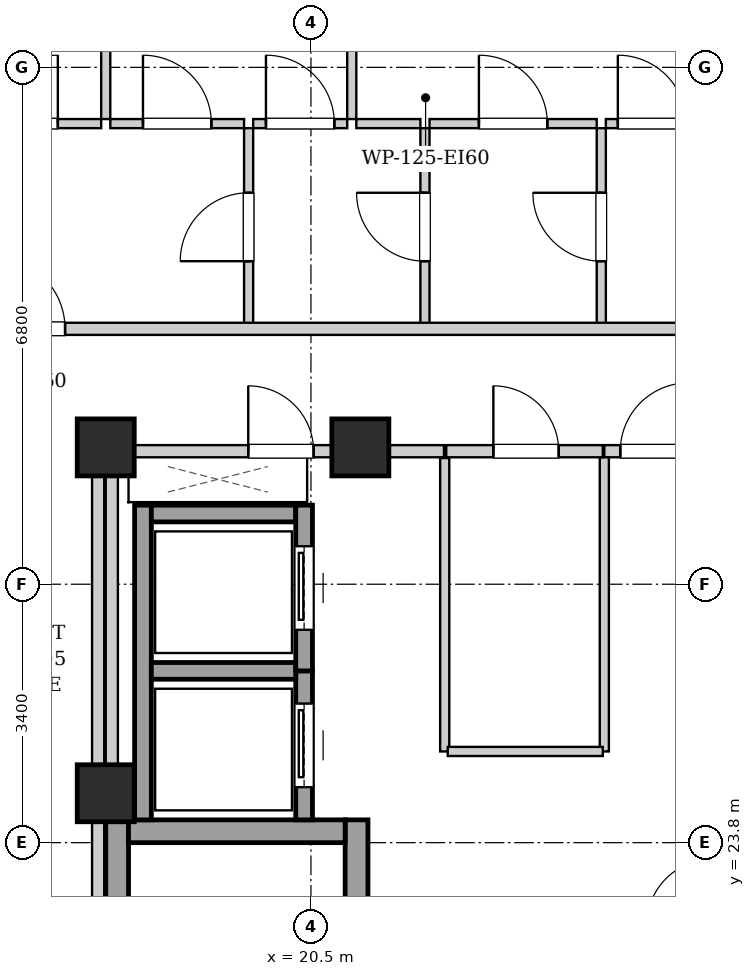
"""IFC4 building model, lengths in metres.
Left out: names, types, materials, properties, quantities, classifications, styles, units other than length and angle.
Written with IfcOpenShell. Run it as: python <this file> out.ifc"""

import sys

from ifc_helpers import new_model, si_unit, direction, frame, frame_2d, origin, origin_2d, place, context, subcontext, project, spatial, rectangle, extrude, element, fill, save


model = new_model("IFC4")
c1 = context("Model", 3, precision=1e-05, world=origin(), true_north=direction((0.0, 1.0)))
c2 = subcontext(c1, "Body", "Model", "MODEL_VIEW")
j1 = project(units=[si_unit("LENGTHUNIT", "METRE"), si_unit("PLANEANGLEUNIT", "RADIAN")], contexts=[c1])
p1 = place(None, origin())
s1 = spatial("IfcSite", under=j1, at=p1, CompositionType="ELEMENT")
p2 = place(p1, origin())
s2 = spatial("IfcBuilding", under=s1, at=p2, CompositionType="ELEMENT")
p3 = place(p2, frame((0.0, 0.0, 258.1)))
s3 = spatial("IfcBuildingStorey", under=s2, at=p3, CompositionType="ELEMENT", Elevation=258.1)
for number, where, z_axis, x_axis in (
    (1, (17.8, 29.0, 0.0), (0.0, 0.0, 1.0), (1.0, 0.0, 0.0)),
    (2, (21.15, 29.0, 0.0), (0.0, 0.0, 1.0), (1.0, 0.0, 0.0)),
    (3, (17.8, 24.45, 0.0), (0.0, 0.0, 1.0), (1.0, 0.0, 0.0)),
):
    element("IfcColumn", number, at=place(p3, frame(where, z_axis=z_axis, x_axis=x_axis)), inside=s3, PredefinedType="COLUMN", context=c2, shape_type="SweptSolid", body=[
        extrude(rectangle(XDim=0.75, YDim=0.75, at=origin_2d()), origin(), (0.0, 0.0, 1.0), 3.4),
    ])
for number, where, z_axis, x_axis in (
    (4, (17.95, 15.1, 0.0), (0.0, 0.0, 1.0), (0.0, 1.0, 0.0)),
    (5, (21.1, 15.1, 0.0), (0.0, 0.0, 1.0), (0.0, 1.0, 0.0)),
):
    element("IfcWall", number, at=place(p3, frame(where, z_axis=z_axis, x_axis=x_axis)), inside=s3, PredefinedType="SHEAR", context=c2, shape_type="SweptSolid", body=[
        extrude(rectangle(XDim=9.0, YDim=0.3, at=frame_2d((4.5, 0.0))), origin(), (0.0, 0.0, 1.0), 3.05),
    ])
p4 = place(p3, frame((18.1, 23.95, 0.0), z_axis=(0.0, 0.0, 1.0), x_axis=(1.0, 0.0, 0.0)))
e6 = element("IfcWall", 6, at=p4, inside=s3, PredefinedType="SHEAR", context=c2, shape_type="SweptSolid", body=[
    extrude(rectangle(XDim=2.85, YDim=0.3, at=frame_2d((1.425, 0.0))), origin(), (0.0, 0.0, 1.0), 3.05),
])
p5 = place(p3, frame((18.29, 24.1, 0.0), z_axis=(0.0, 0.0, 1.0), x_axis=(0.0, 1.0, 0.0)))
e7 = element("IfcWall", 7, at=p5, inside=s3, PredefinedType="SHEAR", context=c2, shape_type="SweptSolid", body=[
    extrude(rectangle(XDim=4.14, YDim=0.22, at=frame_2d((2.07, 0.0))), origin(), (0.0, 0.0, 1.0), 3.05),
])
p6 = place(p3, frame((20.41, 24.1, 0.0), z_axis=(0.0, 0.0, 1.0), x_axis=(0.0, 1.0, 0.0)))
e8 = element("IfcWall", 8, at=p6, inside=s3, PredefinedType="SHEAR", context=c2, shape_type="SweptSolid", body=[
    extrude(rectangle(XDim=1.96, YDim=0.22, at=frame_2d((0.98, 0.0))), origin(), (0.0, 0.0, 1.0), 3.05),
])
p7 = place(p6, frame((0.43, 0.0, 0.0)))
e9 = element("IfcOpeningElement", 9, at=p7, cuts=e8, PredefinedType="OPENING", context=c2, shape_type="SweptSolid", body=[
    extrude(rectangle(XDim=1.1, YDim=2.15, at=frame_2d((0.55, 1.075))), frame((0.0, 0.12, 0.0), z_axis=(0.0, -1.0, 0.0), x_axis=(1.0, 0.0, 0.0)), (0.0, 0.0, 1.0), 0.24),
])
for number, where, z_axis, x_axis in (
    (10, (18.4, 26.06, 0.0), (0.0, 0.0, 1.0), (1.0, 0.0, 0.0)),
    (11, (18.4, 28.13, 0.0), (0.0, 0.0, 1.0), (1.0, 0.0, 0.0)),
):
    element("IfcWall", number, at=place(p3, frame(where, z_axis=z_axis, x_axis=x_axis)), inside=s3, PredefinedType="SHEAR", context=c2, shape_type="SweptSolid", body=[
        extrude(rectangle(XDim=1.9, YDim=0.22, at=frame_2d((0.95, 0.0))), origin(), (0.0, 0.0, 1.0), 3.05),
    ])
p8 = place(p3, frame((20.41, 26.06, 0.0), z_axis=(0.0, 0.0, 1.0), x_axis=(0.0, 1.0, 0.0)))
e12 = element("IfcWall", 12, at=p8, inside=s3, PredefinedType="SHEAR", context=c2, shape_type="SweptSolid", body=[
    extrude(rectangle(XDim=2.18, YDim=0.22, at=frame_2d((1.09, 0.0))), origin(), (0.0, 0.0, 1.0), 3.05),
])
p9 = place(p8, frame((0.54, 0.0, 0.0)))
e13 = element("IfcOpeningElement", 13, at=p9, cuts=e12, PredefinedType="OPENING", context=c2, shape_type="SweptSolid", body=[
    extrude(rectangle(XDim=1.1, YDim=2.15, at=frame_2d((0.55, 1.075))), frame((0.0, 0.12, 0.0), z_axis=(0.0, -1.0, 0.0), x_axis=(1.0, 0.0, 0.0)), (0.0, 0.0, 1.0), 0.24),
])
p10 = place(p3, frame((17.88, 24.12, 0.0), z_axis=(0.0, 0.0, 1.0), x_axis=(0.0, 1.0, 0.0)))
e14 = element("IfcWall", 14, at=p10, inside=s3, PredefinedType="PARTITIONING", context=c2, shape_type="SweptSolid", body=[
    extrude(rectangle(XDim=4.76, YDim=0.16, at=frame_2d((2.38, 0.0))), origin(), (0.0, 0.0, 1.0), 2.385),
])
p11 = place(p3, frame((24.36, 28.95, 0.0), z_axis=(0.0, 0.0, 1.0), x_axis=(1.0, 0.0, 0.0)))
e15 = element("IfcWall", 15, at=p11, inside=s3, PredefinedType="PARTITIONING", context=c2, shape_type="SweptSolid", body=[
    extrude(rectangle(XDim=1.32, YDim=0.16, at=frame_2d((0.66, 0.0))), origin(), (0.0, 0.0, 1.0), 2.578),
])
p12 = place(p11, frame((0.21, 0.0, 0.0)))
e16 = element("IfcOpeningElement", 16, at=p12, cuts=e15, PredefinedType="OPENING", context=c2, shape_type="SweptSolid", body=[
    extrude(rectangle(XDim=0.9, YDim=2.05, at=frame_2d((0.45, 1.025))), frame((0.0, 0.09, 0.0), z_axis=(0.0, -1.0, 0.0), x_axis=(1.0, 0.0, 0.0)), (0.0, 0.0, 1.0), 0.18),
])
p13 = place(p3, frame((17.96, 28.95, 0.0), z_axis=(0.0, 0.0, 1.0), x_axis=(1.0, 0.0, 0.0)))
e17 = element("IfcWall", 17, at=p13, inside=s3, PredefinedType="PARTITIONING", context=c2, shape_type="SweptSolid", body=[
    extrude(rectangle(XDim=4.29, YDim=0.16, at=frame_2d((2.145, 0.0))), origin(), (0.0, 0.0, 1.0), 2.578),
])
p14 = place(p13, frame((1.715, 0.0, 0.0)))
e18 = element("IfcOpeningElement", 18, at=p14, cuts=e17, PredefinedType="OPENING", context=c2, shape_type="SweptSolid", body=[
    extrude(rectangle(XDim=0.86, YDim=2.05, at=frame_2d((0.43, 1.025))), frame((0.0, 0.09, 0.0), z_axis=(0.0, -1.0, 0.0), x_axis=(1.0, 0.0, 0.0)), (0.0, 0.0, 1.0), 0.18),
])
p15 = place(p3, frame((24.36, 25.0, 0.0), z_axis=(0.0, 0.0, 1.0), x_axis=(0.0, 1.0, 0.0)))
e19 = element("IfcWall", 19, at=p15, inside=s3, PredefinedType="PARTITIONING", context=c2, shape_type="SweptSolid", body=[
    extrude(rectangle(XDim=3.87, YDim=0.12, at=frame_2d((1.935, 0.0))), origin(), (0.0, 0.0, 1.0), 3.05),
])
p16 = place(p3, frame((22.26, 25.0, 0.0), z_axis=(0.0, 0.0, 1.0), x_axis=(0.0, 1.0, 0.0)))
e20 = element("IfcWall", 20, at=p16, inside=s3, PredefinedType="PARTITIONING", context=c2, shape_type="SweptSolid", body=[
    extrude(rectangle(XDim=3.86, YDim=0.12, at=frame_2d((1.93, 0.0))), origin(), (0.0, 0.0, 1.0), 3.05),
])
p17 = place(p3, frame((22.3, 25.0, 0.0), z_axis=(0.0, 0.0, 1.0), x_axis=(1.0, 0.0, 0.0)))
e21 = element("IfcWall", 21, at=p17, inside=s3, PredefinedType="PARTITIONING", context=c2, shape_type="SweptSolid", body=[
    extrude(rectangle(XDim=2.04, YDim=0.12, at=frame_2d((1.02, 0.0))), origin(), (0.0, 0.0, 1.0), 3.05),
])
p18 = place(p3, frame((22.28, 28.95, 0.0), z_axis=(0.0, 0.0, 1.0), x_axis=(1.0, 0.0, 0.0)))
e22 = element("IfcWall", 22, at=p18, inside=s3, PredefinedType="PARTITIONING", context=c2, shape_type="SweptSolid", body=[
    extrude(rectangle(XDim=2.06, YDim=0.16, at=frame_2d((1.03, 0.0))), origin(), (0.0, 0.0, 1.0), 2.578),
])
p19 = place(p18, frame((0.62, 0.0, 0.0)))
e23 = element("IfcOpeningElement", 23, at=p19, cuts=e22, PredefinedType="OPENING", context=c2, shape_type="SweptSolid", body=[
    extrude(rectangle(XDim=0.86, YDim=2.05, at=frame_2d((0.43, 1.025))), frame((0.0, 0.09, 0.0), z_axis=(0.0, -1.0, 0.0), x_axis=(1.0, 0.0, 0.0)), (0.0, 0.0, 1.0), 0.18),
])
p20 = place(p3, frame((19.68, 30.6, 0.0), z_axis=(0.0, 0.0, 1.0), x_axis=(0.0, 1.0, 0.0)))
e24 = element("IfcWall", 24, at=p20, inside=s3, PredefinedType="PARTITIONING", context=c2, shape_type="SweptSolid", body=[
    extrude(rectangle(XDim=2.6, YDim=0.12, at=frame_2d((1.3, 0.0))), origin(), (0.0, 0.0, 1.0), 3.05),
])
p21 = place(p20, frame((0.85, 0.0, 0.0)))
e25 = element("IfcOpeningElement", 25, at=p21, cuts=e24, PredefinedType="OPENING", context=c2, shape_type="SweptSolid", body=[
    extrude(rectangle(XDim=0.9, YDim=2.05, at=frame_2d((0.45, 1.025))), frame((0.0, 0.07, 0.0), z_axis=(0.0, -1.0, 0.0), x_axis=(1.0, 0.0, 0.0)), (0.0, 0.0, 1.0), 0.14),
])
p22 = place(p3, frame((15.7, 33.26, 0.0), z_axis=(0.0, 0.0, 1.0), x_axis=(1.0, 0.0, 0.0)))
e26 = element("IfcWall", 26, at=p22, inside=s3, PredefinedType="PARTITIONING", context=c2, shape_type="SweptSolid", body=[
    extrude(rectangle(XDim=2.04, YDim=0.12, at=frame_2d((1.02, 0.0))), origin(), (0.0, 0.0, 1.0), 3.05),
])
p23 = place(p22, frame((0.57, 0.0, 0.0)))
e27 = element("IfcOpeningElement", 27, at=p23, cuts=e26, PredefinedType="OPENING", context=c2, shape_type="SweptSolid", body=[
    extrude(rectangle(XDim=0.9, YDim=2.05, at=frame_2d((0.45, 1.025))), frame((0.0, 0.07, 0.0), z_axis=(0.0, -1.0, 0.0), x_axis=(1.0, 0.0, 0.0)), (0.0, 0.0, 1.0), 0.14),
])
p24 = place(p3, frame((17.86, 33.26, 0.0), z_axis=(0.0, 0.0, 1.0), x_axis=(1.0, 0.0, 0.0)))
e28 = element("IfcWall", 28, at=p24, inside=s3, PredefinedType="PARTITIONING", context=c2, shape_type="SweptSolid", body=[
    extrude(rectangle(XDim=1.76, YDim=0.12, at=frame_2d((0.88, 0.0))), origin(), (0.0, 0.0, 1.0), 3.05),
])
p25 = place(p24, frame((0.43, 0.0, 0.0)))
e29 = element("IfcOpeningElement", 29, at=p25, cuts=e28, PredefinedType="OPENING", context=c2, shape_type="SweptSolid", body=[
    extrude(rectangle(XDim=0.9, YDim=2.05, at=frame_2d((0.45, 1.025))), frame((0.0, 0.07, 0.0), z_axis=(0.0, -1.0, 0.0), x_axis=(1.0, 0.0, 0.0)), (0.0, 0.0, 1.0), 0.14),
])
p26 = place(p3, frame((22.0, 30.6, 0.0), z_axis=(0.0, 0.0, 1.0), x_axis=(0.0, 1.0, 0.0)))
e30 = element("IfcWall", 30, at=p26, inside=s3, PredefinedType="PARTITIONING", context=c2, shape_type="SweptSolid", body=[
    extrude(rectangle(XDim=2.6, YDim=0.12, at=frame_2d((1.3, 0.0))), origin(), (0.0, 0.0, 1.0), 3.05),
])
p27 = place(p26, frame((0.85, 0.0, 0.0)))
e31 = element("IfcOpeningElement", 31, at=p27, cuts=e30, PredefinedType="OPENING", context=c2, shape_type="SweptSolid", body=[
    extrude(rectangle(XDim=0.9, YDim=2.05, at=frame_2d((0.45, 1.025))), frame((0.0, 0.07, 0.0), z_axis=(0.0, -1.0, 0.0), x_axis=(1.0, 0.0, 0.0)), (0.0, 0.0, 1.0), 0.14),
])
p28 = place(p3, frame((19.74, 33.26, 0.0), z_axis=(0.0, 0.0, 1.0), x_axis=(1.0, 0.0, 0.0)))
e32 = element("IfcWall", 32, at=p28, inside=s3, PredefinedType="PARTITIONING", context=c2, shape_type="SweptSolid", body=[
    extrude(rectangle(XDim=1.237, YDim=0.12, at=frame_2d((0.619, 0.0))), origin(), (0.0, 0.0, 1.0), 3.05),
])
p29 = place(p28, frame((0.168, 0.0, 0.0)))
e33 = element("IfcOpeningElement", 33, at=p29, cuts=e32, PredefinedType="OPENING", context=c2, shape_type="SweptSolid", body=[
    extrude(rectangle(XDim=0.9, YDim=2.05, at=frame_2d((0.45, 1.025))), frame((0.0, 0.07, 0.0), z_axis=(0.0, -1.0, 0.0), x_axis=(1.0, 0.0, 0.0)), (0.0, 0.0, 1.0), 0.14),
])
p30 = place(p3, frame((21.097, 33.26, 0.0), z_axis=(0.0, 0.0, 1.0), x_axis=(1.0, 0.0, 0.0)))
e34 = element("IfcWall", 34, at=p30, inside=s3, PredefinedType="PARTITIONING", context=c2, shape_type="SweptSolid", body=[
    extrude(rectangle(XDim=0.843, YDim=0.12, at=frame_2d((0.421, 0.0))), origin(), (0.0, 0.0, 1.0), 3.05),
])
p31 = place(p3, frame((24.32, 30.6, 0.0), z_axis=(0.0, 0.0, 1.0), x_axis=(0.0, 1.0, 0.0)))
e35 = element("IfcWall", 35, at=p31, inside=s3, PredefinedType="PARTITIONING", context=c2, shape_type="SweptSolid", body=[
    extrude(rectangle(XDim=2.6, YDim=0.12, at=frame_2d((1.3, 0.0))), origin(), (0.0, 0.0, 1.0), 3.05),
])
p32 = place(p31, frame((0.85, 0.0, 0.0)))
e36 = element("IfcOpeningElement", 36, at=p32, cuts=e35, PredefinedType="OPENING", context=c2, shape_type="SweptSolid", body=[
    extrude(rectangle(XDim=0.9, YDim=2.05, at=frame_2d((0.45, 1.025))), frame((0.0, 0.07, 0.0), z_axis=(0.0, -1.0, 0.0), x_axis=(1.0, 0.0, 0.0)), (0.0, 0.0, 1.0), 0.14),
])
p33 = place(p3, frame((22.06, 33.26, 0.0), z_axis=(0.0, 0.0, 1.0), x_axis=(1.0, 0.0, 0.0)))
e37 = element("IfcWall", 37, at=p33, inside=s3, PredefinedType="PARTITIONING", context=c2, shape_type="SweptSolid", body=[
    extrude(rectangle(XDim=2.2, YDim=0.12, at=frame_2d((1.1, 0.0))), origin(), (0.0, 0.0, 1.0), 3.05),
])
p34 = place(p33, frame((0.65, 0.0, 0.0)))
e38 = element("IfcOpeningElement", 38, at=p34, cuts=e37, PredefinedType="OPENING", context=c2, shape_type="SweptSolid", body=[
    extrude(rectangle(XDim=0.9, YDim=2.05, at=frame_2d((0.45, 1.025))), frame((0.0, 0.07, 0.0), z_axis=(0.0, -1.0, 0.0), x_axis=(1.0, 0.0, 0.0)), (0.0, 0.0, 1.0), 0.14),
])
p35 = place(p3, frame((24.38, 33.26, 0.0), z_axis=(0.0, 0.0, 1.0), x_axis=(1.0, 0.0, 0.0)))
e39 = element("IfcWall", 39, at=p35, inside=s3, PredefinedType="PARTITIONING", context=c2, shape_type="SweptSolid", body=[
    extrude(rectangle(XDim=1.217, YDim=0.12, at=frame_2d((0.608, 0.0))), origin(), (0.0, 0.0, 1.0), 3.05),
])
p36 = place(p35, frame((0.158, 0.0, 0.0)))
e40 = element("IfcOpeningElement", 40, at=p36, cuts=e39, PredefinedType="OPENING", context=c2, shape_type="SweptSolid", body=[
    extrude(rectangle(XDim=0.9, YDim=2.05, at=frame_2d((0.45, 1.025))), frame((0.0, 0.07, 0.0), z_axis=(0.0, -1.0, 0.0), x_axis=(1.0, 0.0, 0.0)), (0.0, 0.0, 1.0), 0.14),
])
p37 = place(p3, frame((17.8, 33.32, 0.0), z_axis=(0.0, 0.0, 1.0), x_axis=(0.0, 1.0, 0.0)))
e41 = element("IfcWall", 41, at=p37, inside=s3, PredefinedType="PARTITIONING", context=c2, shape_type="SweptSolid", body=[
    extrude(rectangle(XDim=6.6, YDim=0.12, at=frame_2d((3.3, 0.0))), origin(), (0.0, 0.0, 1.0), 2.578),
])
p38 = place(p37, frame((2.835, 0.0, 0.0)))
e42 = element("IfcOpeningElement", 42, at=p38, cuts=e41, PredefinedType="OPENING", context=c2, shape_type="SweptSolid", body=[
    extrude(rectangle(XDim=0.9, YDim=2.05, at=frame_2d((0.45, 1.025))), frame((0.0, 0.07, 0.0), z_axis=(0.0, -1.0, 0.0), x_axis=(1.0, 0.0, 0.0)), (0.0, 0.0, 1.0), 0.14),
])
p39 = place(p3, frame((21.037, 33.32, 0.0), z_axis=(0.0, 0.0, 1.0), x_axis=(0.0, 1.0, 0.0)))
e43 = element("IfcWall", 43, at=p39, inside=s3, PredefinedType="PARTITIONING", context=c2, shape_type="SweptSolid", body=[
    extrude(rectangle(XDim=6.6, YDim=0.12, at=frame_2d((3.3, 0.0))), origin(), (0.0, 0.0, 1.0), 3.05),
])
p40 = place(p39, frame((2.835, 0.0, 0.0)))
e44 = element("IfcOpeningElement", 44, at=p40, cuts=e43, PredefinedType="OPENING", context=c2, shape_type="SweptSolid", body=[
    extrude(rectangle(XDim=0.9, YDim=2.05, at=frame_2d((0.45, 1.025))), frame((0.0, 0.07, 0.0), z_axis=(0.0, -1.0, 0.0), x_axis=(1.0, 0.0, 0.0)), (0.0, 0.0, 1.0), 0.14),
])
p41 = place(p3, frame((13.15, 30.56, 0.0), z_axis=(0.0, 0.0, 1.0), x_axis=(1.0, 0.0, 0.0)))
e45 = element("IfcWall", 45, at=p41, inside=s3, PredefinedType="PARTITIONING", context=c2, shape_type="SweptSolid", body=[
    extrude(rectangle(XDim=24.6, YDim=0.16, at=frame_2d((12.3, 0.0))), origin(), (0.0, 0.0, 1.0), 3.05),
])
p42 = place(p41, frame((3.165, 0.0, 0.0)))
e46 = element("IfcOpeningElement", 46, at=p42, cuts=e45, PredefinedType="OPENING", context=c2, shape_type="SweptSolid", body=[
    extrude(rectangle(XDim=0.95, YDim=2.1, at=frame_2d((0.475, 1.05))), frame((0.0, 0.09, 0.0), z_axis=(0.0, -1.0, 0.0), x_axis=(1.0, 0.0, 0.0)), (0.0, 0.0, 1.0), 0.18),
])
p43 = place(p41, frame((21.55, 0.0, 0.0)))
e47 = element("IfcOpeningElement", 47, at=p43, cuts=e45, PredefinedType="OPENING", context=c2, shape_type="SweptSolid", body=[
    extrude(rectangle(XDim=0.95, YDim=2.1, at=frame_2d((0.475, 1.05))), frame((0.0, 0.09, 0.0), z_axis=(0.0, -1.0, 0.0), x_axis=(1.0, 0.0, 0.0)), (0.0, 0.0, 1.0), 0.18),
])
p44 = place(p3, frame((17.7, 15.02, 0.0), z_axis=(0.0, 0.0, 1.0), x_axis=(0.0, 1.0, 0.0)))
e48 = element("IfcWall", 48, at=p44, inside=s3, PredefinedType="PARTITIONING", context=c2, shape_type="SweptSolid", body=[
    extrude(rectangle(XDim=13.98, YDim=0.16, at=frame_2d((6.99, 0.0))), origin(), (0.0, 0.0, 1.0), 2.385),
])
p45 = place(p7, origin())
e49 = element("IfcDoor", 49, at=p45, inside=s3, OperationType="SLIDING_TO_LEFT", PredefinedType="DOOR", context=c2, shape_type="SweptSolid", body=[
    extrude(rectangle(XDim=1.1, YDim=2.15, at=frame_2d((0.55, 1.075))), frame((0.0, 0.025, 0.0), z_axis=(0.0, -1.0, 0.0), x_axis=(1.0, 0.0, 0.0)), (0.0, 0.0, 1.0), 0.05),
])
fill(e9, e49)
p46 = place(p9, origin())
e50 = element("IfcDoor", 50, at=p46, inside=s3, OperationType="SLIDING_TO_LEFT", PredefinedType="DOOR", context=c2, shape_type="SweptSolid", body=[
    extrude(rectangle(XDim=1.1, YDim=2.15, at=frame_2d((0.55, 1.075))), frame((0.0, 0.025, 0.0), z_axis=(0.0, -1.0, 0.0), x_axis=(1.0, 0.0, 0.0)), (0.0, 0.0, 1.0), 0.05),
])
fill(e13, e50)
p47 = place(p12, origin())
e51 = element("IfcDoor", 51, at=p47, inside=s3, OperationType="SINGLE_SWING_RIGHT", PredefinedType="DOOR", context=c2, shape_type="SweptSolid", body=[
    extrude(rectangle(XDim=0.9, YDim=2.05, at=frame_2d((0.45, 1.025))), frame((0.0, 0.025, 0.0), z_axis=(0.0, -1.0, 0.0), x_axis=(1.0, 0.0, 0.0)), (0.0, 0.0, 1.0), 0.05),
])
fill(e16, e51)
p48 = place(p14, origin())
e52 = element("IfcDoor", 52, at=p48, inside=s3, OperationType="SINGLE_SWING_LEFT", PredefinedType="DOOR", context=c2, shape_type="SweptSolid", body=[
    extrude(rectangle(XDim=0.86, YDim=2.05, at=frame_2d((0.43, 1.025))), frame((0.0, 0.025, 0.0), z_axis=(0.0, -1.0, 0.0), x_axis=(1.0, 0.0, 0.0)), (0.0, 0.0, 1.0), 0.05),
])
fill(e18, e52)
p49 = place(p19, origin())
e53 = element("IfcDoor", 53, at=p49, inside=s3, OperationType="SINGLE_SWING_LEFT", PredefinedType="DOOR", context=c2, shape_type="SweptSolid", body=[
    extrude(rectangle(XDim=0.86, YDim=2.05, at=frame_2d((0.43, 1.025))), frame((0.0, 0.025, 0.0), z_axis=(0.0, -1.0, 0.0), x_axis=(1.0, 0.0, 0.0)), (0.0, 0.0, 1.0), 0.05),
])
fill(e23, e53)
p50 = place(p21, origin())
e54 = element("IfcDoor", 54, at=p50, inside=s3, OperationType="SINGLE_SWING_LEFT", PredefinedType="DOOR", context=c2, shape_type="SweptSolid", body=[
    extrude(rectangle(XDim=0.9, YDim=2.05, at=frame_2d((0.45, 1.025))), frame((0.0, 0.025, 0.0), z_axis=(0.0, -1.0, 0.0), x_axis=(1.0, 0.0, 0.0)), (0.0, 0.0, 1.0), 0.05),
])
fill(e25, e54)
p51 = place(p23, origin())
e55 = element("IfcDoor", 55, at=p51, inside=s3, OperationType="SINGLE_SWING_RIGHT", PredefinedType="DOOR", context=c2, shape_type="SweptSolid", body=[
    extrude(rectangle(XDim=0.9, YDim=2.05, at=frame_2d((0.45, 1.025))), frame((0.0, 0.025, 0.0), z_axis=(0.0, -1.0, 0.0), x_axis=(1.0, 0.0, 0.0)), (0.0, 0.0, 1.0), 0.05),
])
fill(e27, e55)
p52 = place(p25, origin())
e56 = element("IfcDoor", 56, at=p52, inside=s3, OperationType="SINGLE_SWING_LEFT", PredefinedType="DOOR", context=c2, shape_type="SweptSolid", body=[
    extrude(rectangle(XDim=0.9, YDim=2.05, at=frame_2d((0.45, 1.025))), frame((0.0, 0.025, 0.0), z_axis=(0.0, -1.0, 0.0), x_axis=(1.0, 0.0, 0.0)), (0.0, 0.0, 1.0), 0.05),
])
fill(e29, e56)
p53 = place(p27, origin())
e57 = element("IfcDoor", 57, at=p53, inside=s3, OperationType="SINGLE_SWING_RIGHT", PredefinedType="DOOR", context=c2, shape_type="SweptSolid", body=[
    extrude(rectangle(XDim=0.9, YDim=2.05, at=frame_2d((0.45, 1.025))), frame((0.0, 0.025, 0.0), z_axis=(0.0, -1.0, 0.0), x_axis=(1.0, 0.0, 0.0)), (0.0, 0.0, 1.0), 0.05),
])
fill(e31, e57)
p54 = place(p29, origin())
e58 = element("IfcDoor", 58, at=p54, inside=s3, OperationType="SINGLE_SWING_LEFT", PredefinedType="DOOR", context=c2, shape_type="SweptSolid", body=[
    extrude(rectangle(XDim=0.9, YDim=2.05, at=frame_2d((0.45, 1.025))), frame((0.0, 0.025, 0.0), z_axis=(0.0, -1.0, 0.0), x_axis=(1.0, 0.0, 0.0)), (0.0, 0.0, 1.0), 0.05),
])
fill(e33, e58)
p55 = place(p32, origin())
e59 = element("IfcDoor", 59, at=p55, inside=s3, OperationType="SINGLE_SWING_RIGHT", PredefinedType="DOOR", context=c2, shape_type="SweptSolid", body=[
    extrude(rectangle(XDim=0.9, YDim=2.05, at=frame_2d((0.45, 1.025))), frame((0.0, 0.025, 0.0), z_axis=(0.0, -1.0, 0.0), x_axis=(1.0, 0.0, 0.0)), (0.0, 0.0, 1.0), 0.05),
])
fill(e36, e59)
p56 = place(p34, origin())
e60 = element("IfcDoor", 60, at=p56, inside=s3, OperationType="SINGLE_SWING_LEFT", PredefinedType="DOOR", context=c2, shape_type="SweptSolid", body=[
    extrude(rectangle(XDim=0.9, YDim=2.05, at=frame_2d((0.45, 1.025))), frame((0.0, 0.025, 0.0), z_axis=(0.0, -1.0, 0.0), x_axis=(1.0, 0.0, 0.0)), (0.0, 0.0, 1.0), 0.05),
])
fill(e38, e60)
p57 = place(p36, origin())
e61 = element("IfcDoor", 61, at=p57, inside=s3, OperationType="SINGLE_SWING_LEFT", PredefinedType="DOOR", context=c2, shape_type="SweptSolid", body=[
    extrude(rectangle(XDim=0.9, YDim=2.05, at=frame_2d((0.45, 1.025))), frame((0.0, 0.025, 0.0), z_axis=(0.0, -1.0, 0.0), x_axis=(1.0, 0.0, 0.0)), (0.0, 0.0, 1.0), 0.05),
])
fill(e40, e61)
p58 = place(p42, origin())
e62 = element("IfcDoor", 62, at=p58, inside=s3, OperationType="SINGLE_SWING_LEFT", PredefinedType="DOOR", context=c2, shape_type="SweptSolid", body=[
    extrude(rectangle(XDim=0.95, YDim=2.1, at=frame_2d((0.475, 1.05))), frame((0.0, 0.025, 0.0), z_axis=(0.0, -1.0, 0.0), x_axis=(1.0, 0.0, 0.0)), (0.0, 0.0, 1.0), 0.05),
])
fill(e46, e62)
save(model, sys.argv[1])
